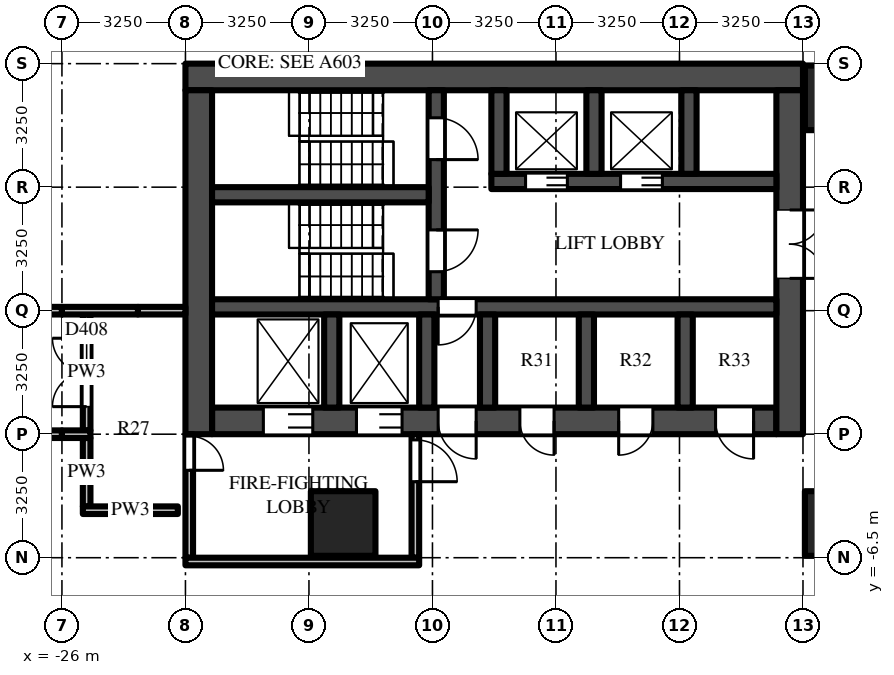
"""IFC4 building model, lengths in metres.
Left out: names, types, materials, properties, quantities, classifications, styles, units other than length and angle.
Written with IfcOpenShell. Run it as: python <this file> out.ifc"""

import sys

from ifc_helpers import new_model, si_unit, direction, frame, frame_2d, origin, origin_2d, place, context, subcontext, project, spatial, rectangle, extrude, source, transform, mapped, element, fill, save


model = new_model("IFC4")
c1 = context("Model", 3, precision=1e-05, world=origin(), true_north=direction((0.0, 1.0)))
c2 = subcontext(c1, "Body", "Model", "MODEL_VIEW")
j1 = project(units=[si_unit("LENGTHUNIT", "METRE"), si_unit("PLANEANGLEUNIT", "RADIAN")], contexts=[c1])
p1 = place(None, origin())
s1 = spatial("IfcSite", under=j1, at=p1, CompositionType="ELEMENT")
p2 = place(p1, origin())
s2 = spatial("IfcBuilding", under=s1, at=p2, CompositionType="ELEMENT")
p3 = place(p2, frame((0.0, 0.0, 14.0)))
s3 = spatial("IfcBuildingStorey", under=s2, at=p3, CompositionType="ELEMENT", Elevation=14.0)
m1 = source(origin(), c2, "Body", "SweptSolid", [
    extrude(rectangle(XDim=1.7, YDim=1.7, at=origin_2d()), origin(), (0.0, 0.0, 1.0), 5.0),
])
for number, where, z_axis, x_axis in (
    (1, (-5.6, 5.6, 0.0), (0.0, 0.0, 1.0), (1.0, 0.0, 0.0)),
    (2, (-5.6, -5.6, 0.0), (0.0, 0.0, 1.0), (1.0, 0.0, 0.0)),
    (3, (-18.6, -5.6, 0.0), (0.0, 0.0, 1.0), (1.0, 0.0, 0.0)),
):
    element("IfcColumn", number, at=place(p3, frame(where, z_axis=z_axis, x_axis=x_axis)), inside=s3, PredefinedType="COLUMN", context=c2, shape_type="MappedRepresentation", body=[
        mapped(m1, transform((0.0, 0.0, 0.0))),
    ])
m2 = source(origin(), c2, "Body", "SweptSolid", [
    extrude(rectangle(XDim=16.25, YDim=0.7, at=frame_2d((8.125, 0.0))), origin(), (0.0, 0.0, 1.0), 4.7),
])
p4 = place(p3, frame((-6.5, 6.15, 0.0), z_axis=(0.0, 0.0, 1.0), x_axis=(-1.0, 0.0, 0.0)))
e4 = element("IfcWall", 4, at=p4, inside=s3, PredefinedType="SHEAR", context=c2, shape_type="MappedRepresentation", body=[
    mapped(m2, transform((0.0, 0.0, 0.0))),
])
m3 = source(origin(), c2, "Body", "SweptSolid", [
    extrude(rectangle(XDim=14.85, YDim=0.7, at=frame_2d((7.425, 0.0))), origin(), (0.0, 0.0, 1.0), 4.7),
])
p5 = place(p3, frame((-7.2, -2.9, 0.0), z_axis=(0.0, 0.0, 1.0), x_axis=(-1.0, 0.0, 0.0)))
e5 = element("IfcWall", 5, at=p5, inside=s3, PredefinedType="SHEAR", context=c2, shape_type="MappedRepresentation", body=[
    mapped(m3, transform((0.0, 0.0, 0.0))),
])
m4 = source(origin(), c2, "Body", "SweptSolid", [
    extrude(rectangle(XDim=1.3, YDim=2.1, at=frame_2d((0.65, 1.05))), frame((0.0, 0.36, 0.0), z_axis=(0.0, -1.0, 0.0), x_axis=(1.0, 0.0, 0.0)), (0.0, 0.0, 1.0), 0.72),
])
p6 = place(p5, frame((12.2, 0.0, 0.0)))
e6 = element("IfcOpeningElement", 6, at=p6, cuts=e5, PredefinedType="OPENING", context=c2, shape_type="MappedRepresentation", body=[
    mapped(m4, transform((0.0, 0.0, 0.0))),
])
m5 = source(origin(), c2, "Body", "SweptSolid", [
    extrude(rectangle(XDim=1.2, YDim=2.1, at=frame_2d((0.6, 1.05))), frame((0.0, 0.36, 0.0), z_axis=(0.0, -1.0, 0.0), x_axis=(1.0, 0.0, 0.0)), (0.0, 0.0, 1.0), 0.72),
])
p7 = place(p5, frame((9.85, 0.0, 0.0)))
e7 = element("IfcOpeningElement", 7, at=p7, cuts=e5, PredefinedType="OPENING", context=c2, shape_type="MappedRepresentation", body=[
    mapped(m5, transform((0.0, 0.0, 0.0))),
])
m6 = source(origin(), c2, "Body", "SweptSolid", [
    extrude(rectangle(XDim=1.0, YDim=2.1, at=frame_2d((0.5, 1.05))), frame((0.0, 0.36, 0.0), z_axis=(0.0, -1.0, 0.0), x_axis=(1.0, 0.0, 0.0)), (0.0, 0.0, 1.0), 0.72),
])
p8 = place(p5, frame((7.9, 0.0, 0.0)))
e8 = element("IfcOpeningElement", 8, at=p8, cuts=e5, PredefinedType="OPENING", context=c2, shape_type="MappedRepresentation", body=[
    mapped(m6, transform((0.0, 0.0, 0.0))),
])
p9 = place(p5, frame((0.6, 0.0, 0.0)))
e9 = element("IfcOpeningElement", 9, at=p9, cuts=e5, PredefinedType="OPENING", context=c2, shape_type="MappedRepresentation", body=[
    mapped(m6, transform((0.0, 0.0, 0.0))),
])
m7 = source(origin(), c2, "Body", "SweptSolid", [
    extrude(rectangle(XDim=0.9, YDim=2.1, at=frame_2d((0.45, 1.05))), frame((0.0, 0.36, 0.0), z_axis=(0.0, -1.0, 0.0), x_axis=(1.0, 0.0, 0.0)), (0.0, 0.0, 1.0), 0.72),
])
p10 = place(p5, frame((3.25, 0.0, 0.0)))
e10 = element("IfcOpeningElement", 10, at=p10, cuts=e5, PredefinedType="OPENING", context=c2, shape_type="MappedRepresentation", body=[
    mapped(m7, transform((0.0, 0.0, 0.0))),
])
p11 = place(p5, frame((5.85, 0.0, 0.0)))
e11 = element("IfcOpeningElement", 11, at=p11, cuts=e5, PredefinedType="OPENING", context=c2, shape_type="MappedRepresentation", body=[
    mapped(m7, transform((0.0, 0.0, 0.0))),
])
m8 = source(origin(), c2, "Body", "SweptSolid", [
    extrude(rectangle(XDim=9.05, YDim=0.7, at=frame_2d((4.525, 0.0))), origin(), (0.0, 0.0, 1.0), 4.7),
])
p12 = place(p3, frame((-6.85, 5.8, 0.0), z_axis=(0.0, 0.0, 1.0), x_axis=(0.0, -1.0, 0.0)))
e12 = element("IfcWall", 12, at=p12, inside=s3, PredefinedType="SHEAR", context=c2, shape_type="MappedRepresentation", body=[
    mapped(m8, transform((0.0, 0.0, 0.0))),
])
m9 = source(origin(), c2, "Body", "SweptSolid", [
    extrude(rectangle(XDim=1.8, YDim=2.1, at=frame_2d((0.9, 1.05))), frame((0.0, 0.36, 0.0), z_axis=(0.0, -1.0, 0.0), x_axis=(1.0, 0.0, 0.0)), (0.0, 0.0, 1.0), 0.72),
])
p13 = place(p12, frame((3.15, 0.0, 0.0)))
e13 = element("IfcOpeningElement", 13, at=p13, cuts=e12, PredefinedType="OPENING", context=c2, shape_type="MappedRepresentation", body=[
    mapped(m9, transform((0.0, 0.0, 0.0))),
])
p14 = place(p3, frame((-22.4, 5.8, 0.0), z_axis=(0.0, 0.0, 1.0), x_axis=(0.0, -1.0, 0.0)))
e14 = element("IfcWall", 14, at=p14, inside=s3, PredefinedType="SHEAR", context=c2, shape_type="MappedRepresentation", body=[
    mapped(m8, transform((0.0, 0.0, 0.0))),
])
m10 = source(origin(), c2, "Body", "SweptSolid", [
    extrude(rectangle(XDim=7.5, YDim=0.4, at=frame_2d((3.75, 0.0))), origin(), (0.0, 0.0, 1.0), 4.7),
])
p15 = place(p3, frame((-7.2, 3.4, 0.0), z_axis=(0.0, 0.0, 1.0), x_axis=(-1.0, 0.0, 0.0)))
e15 = element("IfcWall", 15, at=p15, inside=s3, PredefinedType="SHEAR", context=c2, shape_type="MappedRepresentation", body=[
    mapped(m10, transform((0.0, 0.0, 0.0))),
])
m11 = source(origin(), c2, "Body", "SweptSolid", [
    extrude(rectangle(XDim=1.1, YDim=2.1, at=frame_2d((0.55, 1.05))), frame((0.0, 0.21, 0.0), z_axis=(0.0, -1.0, 0.0), x_axis=(1.0, 0.0, 0.0)), (0.0, 0.0, 1.0), 0.42),
])
p16 = place(p15, frame((3.0, 0.0, 0.0)))
e16 = element("IfcOpeningElement", 16, at=p16, cuts=e15, PredefinedType="OPENING", context=c2, shape_type="MappedRepresentation", body=[
    mapped(m11, transform((0.0, 0.0, 0.0))),
])
p17 = place(p15, frame((5.5, 0.0, 0.0)))
e17 = element("IfcOpeningElement", 17, at=p17, cuts=e15, PredefinedType="OPENING", context=c2, shape_type="MappedRepresentation", body=[
    mapped(m11, transform((0.0, 0.0, 0.0))),
])
m12 = source(origin(), c2, "Body", "SweptSolid", [
    extrude(rectangle(XDim=14.85, YDim=0.4, at=frame_2d((7.425, 0.0))), origin(), (0.0, 0.0, 1.0), 4.7),
])
p18 = place(p3, frame((-7.2, 0.1, 0.0), z_axis=(0.0, 0.0, 1.0), x_axis=(-1.0, 0.0, 0.0)))
e18 = element("IfcWall", 18, at=p18, inside=s3, PredefinedType="SHEAR", context=c2, shape_type="MappedRepresentation", body=[
    mapped(m12, transform((0.0, 0.0, 0.0))),
])
m13 = source(origin(), c2, "Body", "SweptSolid", [
    extrude(rectangle(XDim=1.0, YDim=2.1, at=frame_2d((0.5, 1.05))), frame((0.0, 0.21, 0.0), z_axis=(0.0, -1.0, 0.0), x_axis=(1.0, 0.0, 0.0)), (0.0, 0.0, 1.0), 0.42),
])
p19 = place(p18, frame((7.9, 0.0, 0.0)))
e19 = element("IfcOpeningElement", 19, at=p19, cuts=e18, PredefinedType="OPENING", context=c2, shape_type="MappedRepresentation", body=[
    mapped(m13, transform((0.0, 0.0, 0.0))),
])
m14 = source(origin(), c2, "Body", "SweptSolid", [
    extrude(rectangle(XDim=5.5, YDim=0.4, at=frame_2d((2.75, 0.0))), origin(), (0.0, 0.0, 1.0), 4.7),
])
p20 = place(p3, frame((-16.15, 5.8, 0.0), z_axis=(0.0, 0.0, 1.0), x_axis=(0.0, -1.0, 0.0)))
e20 = element("IfcWall", 20, at=p20, inside=s3, PredefinedType="SHEAR", context=c2, shape_type="MappedRepresentation", body=[
    mapped(m14, transform((0.0, 0.0, 0.0))),
])
p21 = place(p20, frame((0.725, 0.0, 0.0)))
e21 = element("IfcOpeningElement", 21, at=p21, cuts=e20, PredefinedType="OPENING", context=c2, shape_type="MappedRepresentation", body=[
    mapped(m11, transform((0.0, 0.0, 0.0))),
])
p22 = place(p20, frame((3.675, 0.0, 0.0)))
e22 = element("IfcOpeningElement", 22, at=p22, cuts=e20, PredefinedType="OPENING", context=c2, shape_type="MappedRepresentation", body=[
    mapped(m11, transform((0.0, 0.0, 0.0))),
])
m15 = source(origin(), c2, "Body", "SweptSolid", [
    extrude(rectangle(XDim=5.7, YDim=0.4, at=frame_2d((2.85, 0.0))), origin(), (0.0, 0.0, 1.0), 4.7),
])
p23 = place(p3, frame((-16.35, 3.05, 0.0), z_axis=(0.0, 0.0, 1.0), x_axis=(-1.0, 0.0, 0.0)))
e23 = element("IfcWall", 23, at=p23, inside=s3, PredefinedType="SHEAR", context=c2, shape_type="MappedRepresentation", body=[
    mapped(m15, transform((0.0, 0.0, 0.0))),
])
m16 = source(origin(), c2, "Body", "SweptSolid", [
    extrude(rectangle(XDim=2.2, YDim=0.4, at=frame_2d((1.1, 0.0))), origin(), (0.0, 0.0, 1.0), 4.7),
])
for number, where, z_axis, x_axis in (
    (24, (-9.5, 5.8, 0.0), (0.0, 0.0, 1.0), (0.0, -1.0, 0.0)),
    (25, (-12.0, 5.8, 0.0), (0.0, 0.0, 1.0), (0.0, -1.0, 0.0)),
    (26, (-14.5, 5.8, 0.0), (0.0, 0.0, 1.0), (0.0, -1.0, 0.0)),
):
    element("IfcWall", number, at=place(p3, frame(where, z_axis=z_axis, x_axis=x_axis)), inside=s3, PredefinedType="SHEAR", context=c2, shape_type="MappedRepresentation", body=[
        mapped(m16, transform((0.0, 0.0, 0.0))),
    ])
m17 = source(origin(), c2, "Body", "SweptSolid", [
    extrude(rectangle(XDim=2.45, YDim=0.4, at=frame_2d((1.225, 0.0))), origin(), (0.0, 0.0, 1.0), 4.7),
])
for number, where, z_axis, x_axis in (
    (27, (-9.6, -0.1, 0.0), (0.0, 0.0, 1.0), (0.0, -1.0, 0.0)),
    (28, (-12.2, -0.1, 0.0), (0.0, 0.0, 1.0), (0.0, -1.0, 0.0)),
    (29, (-14.8, -0.1, 0.0), (0.0, 0.0, 1.0), (0.0, -1.0, 0.0)),
    (30, (-16.4, -0.1, 0.0), (0.0, 0.0, 1.0), (0.0, -1.0, 0.0)),
    (31, (-18.9, -0.1, 0.0), (0.0, 0.0, 1.0), (0.0, -1.0, 0.0)),
):
    element("IfcWall", number, at=place(p3, frame(where, z_axis=z_axis, x_axis=x_axis)), inside=s3, PredefinedType="SHEAR", context=c2, shape_type="MappedRepresentation", body=[
        mapped(m17, transform((0.0, 0.0, 0.0))),
    ])
m18 = source(origin(), c2, "Body", "SweptSolid", [
    extrude(rectangle(XDim=3.25, YDim=0.2, at=frame_2d((1.625, 0.0))), origin(), (0.0, 0.0, 1.0), 4.7),
])
p24 = place(p3, frame((-16.7, -3.25, 0.0), z_axis=(0.0, 0.0, 1.0), x_axis=(0.0, -1.0, 0.0)))
e32 = element("IfcWall", 32, at=p24, inside=s3, PredefinedType="PARTITIONING", context=c2, shape_type="MappedRepresentation", body=[
    mapped(m18, transform((0.0, 0.0, 0.0))),
])
m19 = source(origin(), c2, "Body", "SweptSolid", [
    extrude(rectangle(XDim=1.1, YDim=2.1, at=frame_2d((0.55, 1.05))), frame((0.0, 0.11, 0.0), z_axis=(0.0, -1.0, 0.0), x_axis=(1.0, 0.0, 0.0)), (0.0, 0.0, 1.0), 0.22),
])
p25 = place(p24, frame((0.15, 0.0, 0.0)))
e33 = element("IfcOpeningElement", 33, at=p25, cuts=e32, PredefinedType="OPENING", context=c2, shape_type="MappedRepresentation", body=[
    mapped(m19, transform((0.0, 0.0, 0.0))),
])
p26 = place(p3, frame((-22.65, -3.25, 0.0), z_axis=(0.0, 0.0, 1.0), x_axis=(0.0, -1.0, 0.0)))
e34 = element("IfcWall", 34, at=p26, inside=s3, PredefinedType="PARTITIONING", context=c2, shape_type="MappedRepresentation", body=[
    mapped(m18, transform((0.0, 0.0, 0.0))),
])
m20 = source(origin(), c2, "Body", "SweptSolid", [
    extrude(rectangle(XDim=0.9, YDim=2.1, at=frame_2d((0.45, 1.05))), frame((0.0, 0.11, 0.0), z_axis=(0.0, -1.0, 0.0), x_axis=(1.0, 0.0, 0.0)), (0.0, 0.0, 1.0), 0.22),
])
p27 = place(p26, frame((0.05, 0.0, 0.0)))
e35 = element("IfcOpeningElement", 35, at=p27, cuts=e34, PredefinedType="OPENING", context=c2, shape_type="MappedRepresentation", body=[
    mapped(m20, transform((0.0, 0.0, 0.0))),
])
m21 = source(origin(), c2, "Body", "SweptSolid", [
    extrude(rectangle(XDim=6.15, YDim=0.2, at=frame_2d((3.075, 0.0))), origin(), (0.0, 0.0, 1.0), 4.7),
])
p28 = place(p3, frame((-16.6, -6.6, 0.0), z_axis=(0.0, 0.0, 1.0), x_axis=(-1.0, 0.0, 0.0)))
e36 = element("IfcWall", 36, at=p28, inside=s3, PredefinedType="PARTITIONING", context=c2, shape_type="MappedRepresentation", body=[
    mapped(m21, transform((0.0, 0.0, 0.0))),
])
m22 = source(origin(), c2, "Body", "SweptSolid", [
    extrude(rectangle(XDim=3.05, YDim=0.2, at=frame_2d((1.525, 0.0))), origin(), (0.0, 0.0, 1.0), 4.077),
])
p29 = place(p3, frame((-25.35, -3.15, 0.0), z_axis=(0.0, 0.0, 1.0), x_axis=(0.0, 1.0, 0.0)))
e37 = element("IfcWall", 37, at=p29, inside=s3, PredefinedType="PARTITIONING", context=c2, shape_type="MappedRepresentation", body=[
    mapped(m22, transform((0.0, 0.0, 0.0))),
])
m23 = source(origin(), c2, "Body", "SweptSolid", [
    extrude(rectangle(XDim=1.8, YDim=2.1, at=frame_2d((0.9, 1.05))), frame((0.0, 0.11, 0.0), z_axis=(0.0, -1.0, 0.0), x_axis=(1.0, 0.0, 0.0)), (0.0, 0.0, 1.0), 0.22),
])
p30 = place(p29, frame((0.625, 0.0, 0.0)))
e38 = element("IfcOpeningElement", 38, at=p30, cuts=e37, PredefinedType="OPENING", context=c2, shape_type="MappedRepresentation", body=[
    mapped(m23, transform((0.0, 0.0, 0.0))),
])
m24 = source(origin(), c2, "Body", "SweptSolid", [
    extrude(rectangle(XDim=1.8, YDim=0.2, at=frame_2d((0.9, 0.0))), origin(), (0.0, 0.0, 1.0), 4.7),
])
p31 = place(p3, frame((-25.35, -3.35, 0.0), z_axis=(0.0, 0.0, 1.0), x_axis=(0.0, -1.0, 0.0)))
e39 = element("IfcWall", 39, at=p31, inside=s3, PredefinedType="PARTITIONING", context=c2, shape_type="MappedRepresentation", body=[
    mapped(m24, transform((0.0, 0.0, 0.0))),
])
m25 = source(origin(), c2, "Body", "SweptSolid", [
    extrude(rectangle(XDim=1.05, YDim=0.2, at=frame_2d((0.525, 0.0))), origin(), (0.0, 0.0, 1.0), 4.7),
])
p32 = place(p3, frame((-24.0, -5.25, 0.0), z_axis=(0.0, 0.0, 1.0), x_axis=(1.0, 0.0, 0.0)))
e40 = element("IfcWall", 40, at=p32, inside=s3, PredefinedType="PARTITIONING", context=c2, shape_type="MappedRepresentation", body=[
    mapped(m25, transform((0.0, 0.0, 0.0))),
])
m26 = source(origin(), c2, "Body", "SweptSolid", [
    extrude(rectangle(XDim=1.45, YDim=0.2, at=frame_2d((0.725, 0.0))), origin(), (0.0, 0.0, 1.0), 4.7),
])
p33 = place(p3, frame((-24.0, -5.25, 0.0), z_axis=(0.0, 0.0, 1.0), x_axis=(-1.0, 0.0, 0.0)))
e41 = element("IfcWall", 41, at=p33, inside=s3, PredefinedType="PARTITIONING", context=c2, shape_type="MappedRepresentation", body=[
    mapped(m26, transform((0.0, 0.0, 0.0))),
])
m27 = source(origin(), c2, "Body", "SweptSolid", [
    extrude(rectangle(XDim=3.312, YDim=0.2, at=frame_2d((1.656, 0.0))), origin(), (0.0, 0.0, 1.0), 4.7),
])
p34 = place(p3, frame((-26.0, -3.25, 0.0), z_axis=(0.0, 0.0, 1.0), x_axis=(-1.0, 0.0, 0.0)))
e42 = element("IfcWall", 42, at=p34, inside=s3, PredefinedType="PARTITIONING", context=c2, shape_type="MappedRepresentation", body=[
    mapped(m27, transform((0.0, 0.0, 0.0))),
])
p35 = place(p34, frame((0.725, 0.0, 0.0)))
e43 = element("IfcOpeningElement", 43, at=p35, cuts=e42, PredefinedType="OPENING", context=c2, shape_type="MappedRepresentation", body=[
    mapped(m23, transform((0.0, 0.0, 0.0))),
])
m28 = source(origin(), c2, "Body", "SweptSolid", [
    extrude(rectangle(XDim=0.75, YDim=0.2, at=frame_2d((0.375, 0.0))), origin(), (0.0, 0.0, 1.0), 4.7),
])
p36 = place(p3, frame((-25.25, -3.25, 0.0), z_axis=(0.0, 0.0, 1.0), x_axis=(-1.0, 0.0, 0.0)))
e44 = element("IfcWall", 44, at=p36, inside=s3, PredefinedType="PARTITIONING", context=c2, shape_type="MappedRepresentation", body=[
    mapped(m28, transform((0.0, 0.0, 0.0))),
])
m29 = source(origin(), c2, "Body", "SweptSolid", [
    extrude(rectangle(XDim=3.25, YDim=0.2, at=frame_2d((1.625, 0.0))), origin(), (0.0, 0.0, 1.0), 4.077),
])
p37 = place(p3, frame((-29.25, 0.0, 0.0), z_axis=(0.0, 0.0, 1.0), x_axis=(1.0, 0.0, 0.0)))
e45 = element("IfcWall", 45, at=p37, inside=s3, PredefinedType="PARTITIONING", context=c2, shape_type="MappedRepresentation", body=[
    mapped(m29, transform((0.0, 0.0, 0.0))),
])
p38 = place(p37, frame((0.725, 0.0, 0.0)))
e46 = element("IfcOpeningElement", 46, at=p38, cuts=e45, PredefinedType="OPENING", context=c2, shape_type="MappedRepresentation", body=[
    mapped(m23, transform((0.0, 0.0, 0.0))),
])
m30 = source(origin(), c2, "Body", "SweptSolid", [
    extrude(rectangle(XDim=1.25, YDim=0.2, at=frame_2d((0.625, 0.0))), origin(), (0.0, 0.0, 1.0), 4.077),
])
p39 = place(p3, frame((-24.0, 0.0, 0.0), z_axis=(0.0, 0.0, 1.0), x_axis=(1.0, 0.0, 0.0)))
e47 = element("IfcWall", 47, at=p39, inside=s3, PredefinedType="PARTITIONING", context=c2, shape_type="MappedRepresentation", body=[
    mapped(m30, transform((0.0, 0.0, 0.0))),
])
m31 = source(origin(), c2, "Body", "SweptSolid", [
    extrude(rectangle(XDim=2.0, YDim=0.2, at=frame_2d((1.0, 0.0))), origin(), (0.0, 0.0, 1.0), 4.077),
])
p40 = place(p3, frame((-26.0, 0.0, 0.0), z_axis=(0.0, 0.0, 1.0), x_axis=(1.0, 0.0, 0.0)))
e48 = element("IfcWall", 48, at=p40, inside=s3, PredefinedType="PARTITIONING", context=c2, shape_type="MappedRepresentation", body=[
    mapped(m31, transform((0.0, 0.0, 0.0))),
])
m32 = source(origin(), c2, "Body", "SweptSolid", [
    extrude(rectangle(XDim=1.1, YDim=2.1, at=frame_2d((0.55, 1.05))), frame((0.0, 0.025, 0.0), z_axis=(0.0, -1.0, 0.0), x_axis=(1.0, 0.0, 0.0)), (0.0, 0.0, 1.0), 0.05),
])
p41 = place(p16, origin())
e49 = element("IfcDoor", 49, at=p41, inside=s3, OperationType="DOUBLE_DOOR_SLIDING", PredefinedType="DOOR", context=c2, shape_type="MappedRepresentation", body=[
    mapped(m32, transform((0.0, 0.0, 0.0))),
])
fill(e16, e49)
p42 = place(p17, origin())
e50 = element("IfcDoor", 50, at=p42, inside=s3, OperationType="DOUBLE_DOOR_SLIDING", PredefinedType="DOOR", context=c2, shape_type="MappedRepresentation", body=[
    mapped(m32, transform((0.0, 0.0, 0.0))),
])
fill(e17, e50)
m33 = source(origin(), c2, "Body", "SweptSolid", [
    extrude(rectangle(XDim=1.3, YDim=2.1, at=frame_2d((0.65, 1.05))), frame((0.0, -0.275, 0.0), z_axis=(0.0, -1.0, 0.0), x_axis=(1.0, 0.0, 0.0)), (0.0, 0.0, 1.0), 0.05),
])
p43 = place(p6, origin())
e51 = element("IfcDoor", 51, at=p43, inside=s3, OperationType="DOUBLE_DOOR_SLIDING", PredefinedType="DOOR", context=c2, shape_type="MappedRepresentation", body=[
    mapped(m33, transform((0.0, 0.0, 0.0))),
])
fill(e6, e51)
m34 = source(origin(), c2, "Body", "SweptSolid", [
    extrude(rectangle(XDim=1.2, YDim=2.1, at=frame_2d((0.6, 1.05))), frame((0.0, -0.275, 0.0), z_axis=(0.0, -1.0, 0.0), x_axis=(1.0, 0.0, 0.0)), (0.0, 0.0, 1.0), 0.05),
])
p44 = place(p7, origin())
e52 = element("IfcDoor", 52, at=p44, inside=s3, OperationType="DOUBLE_DOOR_SLIDING", PredefinedType="DOOR", context=c2, shape_type="MappedRepresentation", body=[
    mapped(m34, transform((0.0, 0.0, 0.0))),
])
fill(e7, e52)
m35 = source(origin(), c2, "Body", "SweptSolid", [
    extrude(rectangle(XDim=1.8, YDim=2.1, at=frame_2d((0.9, 1.05))), frame((0.0, -0.275, 0.0), z_axis=(0.0, -1.0, 0.0), x_axis=(1.0, 0.0, 0.0)), (0.0, 0.0, 1.0), 0.05),
])
p45 = place(p13, origin())
e53 = element("IfcDoor", 53, at=p45, inside=s3, OperationType="DOUBLE_DOOR_SINGLE_SWING", PredefinedType="DOOR", context=c2, shape_type="MappedRepresentation", body=[
    mapped(m35, transform((0.0, 0.0, 0.0))),
])
fill(e13, e53)
p46 = place(p21, origin())
e54 = element("IfcDoor", 54, at=p46, inside=s3, OperationType="SINGLE_SWING_RIGHT", PredefinedType="DOOR", context=c2, shape_type="MappedRepresentation", body=[
    mapped(m32, transform((0.0, 0.0, 0.0))),
])
fill(e21, e54)
p47 = place(p22, origin())
e55 = element("IfcDoor", 55, at=p47, inside=s3, OperationType="SINGLE_SWING_LEFT", PredefinedType="DOOR", context=c2, shape_type="MappedRepresentation", body=[
    mapped(m32, transform((0.0, 0.0, 0.0))),
])
fill(e22, e55)
m36 = source(origin(), c2, "Body", "SweptSolid", [
    extrude(rectangle(XDim=1.0, YDim=2.1, at=frame_2d((0.5, 1.05))), frame((0.0, 0.025, 0.0), z_axis=(0.0, -1.0, 0.0), x_axis=(1.0, 0.0, 0.0)), (0.0, 0.0, 1.0), 0.05),
])
p48 = place(p19, origin())
e56 = element("IfcDoor", 56, at=p48, inside=s3, OperationType="SINGLE_SWING_RIGHT", PredefinedType="DOOR", context=c2, shape_type="MappedRepresentation", body=[
    mapped(m36, transform((0.0, 0.0, 0.0))),
])
fill(e19, e56)
m37 = source(origin(), c2, "Body", "SweptSolid", [
    extrude(rectangle(XDim=1.0, YDim=2.1, at=frame_2d((0.5, 1.05))), frame((0.0, -0.275, 0.0), z_axis=(0.0, -1.0, 0.0), x_axis=(1.0, 0.0, 0.0)), (0.0, 0.0, 1.0), 0.05),
])
p49 = place(p8, origin())
e57 = element("IfcDoor", 57, at=p49, inside=s3, OperationType="SINGLE_SWING_LEFT", PredefinedType="DOOR", context=c2, shape_type="MappedRepresentation", body=[
    mapped(m37, transform((0.0, 0.0, 0.0))),
])
fill(e8, e57)
p50 = place(p25, origin())
e58 = element("IfcDoor", 58, at=p50, inside=s3, OperationType="SINGLE_SWING_RIGHT", PredefinedType="DOOR", context=c2, shape_type="MappedRepresentation", body=[
    mapped(m32, transform((0.0, 0.0, 0.0))),
])
fill(e33, e58)
m38 = source(origin(), c2, "Body", "SweptSolid", [
    extrude(rectangle(XDim=0.9, YDim=2.1, at=frame_2d((0.45, 1.05))), frame((0.0, 0.025, 0.0), z_axis=(0.0, -1.0, 0.0), x_axis=(1.0, 0.0, 0.0)), (0.0, 0.0, 1.0), 0.05),
])
p51 = place(p27, origin())
e59 = element("IfcDoor", 59, at=p51, inside=s3, OperationType="SINGLE_SWING_RIGHT", PredefinedType="DOOR", context=c2, shape_type="MappedRepresentation", body=[
    mapped(m38, transform((0.0, 0.0, 0.0))),
])
fill(e35, e59)
p52 = place(p9, origin())
e60 = element("IfcDoor", 60, at=p52, inside=s3, OperationType="SINGLE_SWING_LEFT", PredefinedType="DOOR", context=c2, shape_type="MappedRepresentation", body=[
    mapped(m37, transform((0.0, 0.0, 0.0))),
])
fill(e9, e60)
m39 = source(origin(), c2, "Body", "SweptSolid", [
    extrude(rectangle(XDim=0.9, YDim=2.1, at=frame_2d((0.45, 1.05))), frame((0.0, -0.275, 0.0), z_axis=(0.0, -1.0, 0.0), x_axis=(1.0, 0.0, 0.0)), (0.0, 0.0, 1.0), 0.05),
])
p53 = place(p10, origin())
e61 = element("IfcDoor", 61, at=p53, inside=s3, OperationType="SINGLE_SWING_RIGHT", PredefinedType="DOOR", context=c2, shape_type="MappedRepresentation", body=[
    mapped(m39, transform((0.0, 0.0, 0.0))),
])
fill(e10, e61)
p54 = place(p11, origin())
e62 = element("IfcDoor", 62, at=p54, inside=s3, OperationType="SINGLE_SWING_LEFT", PredefinedType="DOOR", context=c2, shape_type="MappedRepresentation", body=[
    mapped(m39, transform((0.0, 0.0, 0.0))),
])
fill(e11, e62)
m40 = source(origin(), c2, "Body", "SweptSolid", [
    extrude(rectangle(XDim=1.8, YDim=2.1, at=frame_2d((0.9, 1.05))), frame((0.0, 0.025, 0.0), z_axis=(0.0, -1.0, 0.0), x_axis=(1.0, 0.0, 0.0)), (0.0, 0.0, 1.0), 0.05),
])
p55 = place(p30, origin())
e63 = element("IfcDoor", 63, at=p55, inside=s3, OperationType="DOUBLE_DOOR_SINGLE_SWING", PredefinedType="DOOR", context=c2, shape_type="MappedRepresentation", body=[
    mapped(m40, transform((0.0, 0.0, 0.0))),
])
fill(e38, e63)
save(model, sys.argv[1])
